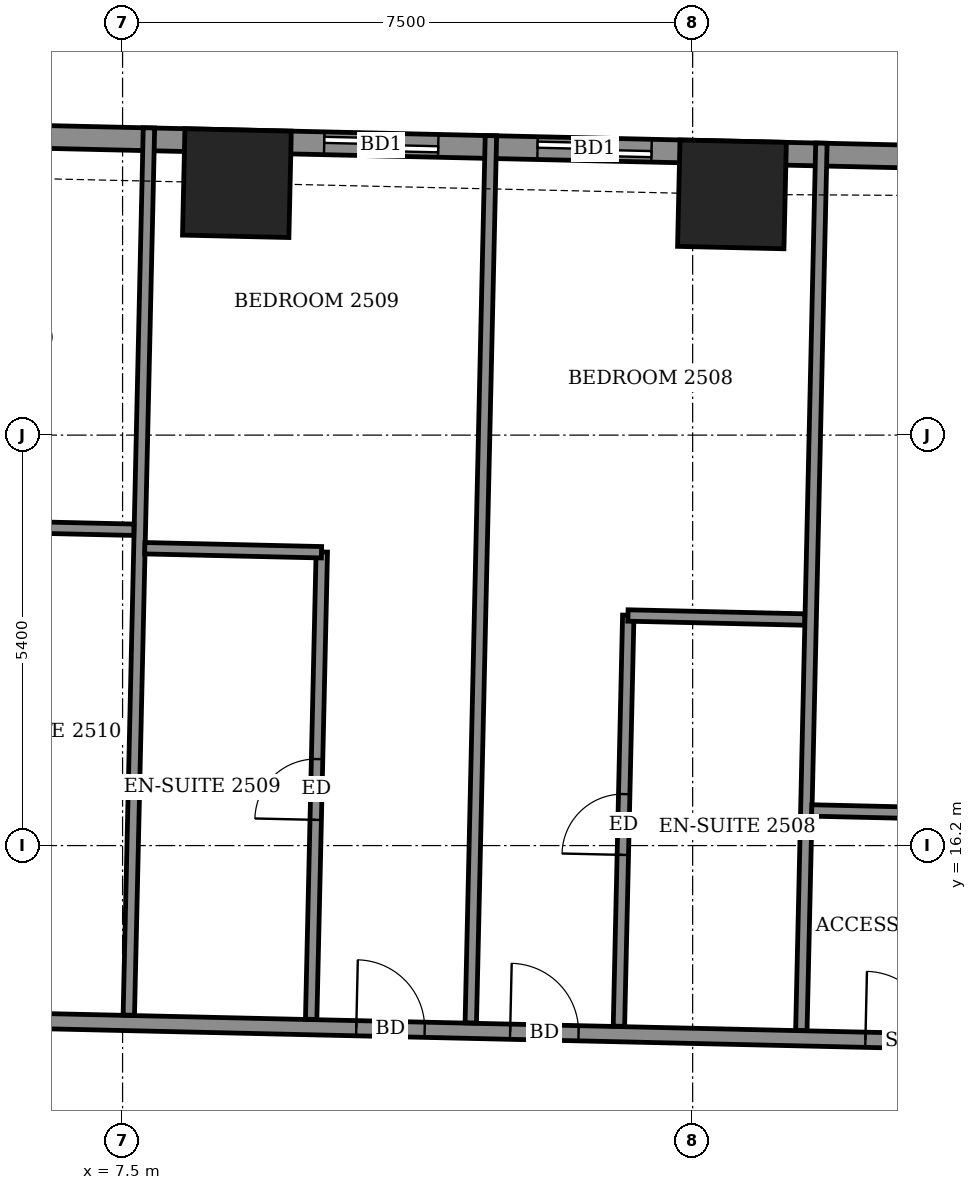
"""IFC4 building model, lengths in metres.
Left out: names, types, materials, properties, quantities, classifications, styles, units other than length and angle.
Written with IfcOpenShell. Run it as: python <this file> out.ifc"""

import sys

from ifc_helpers import new_model, si_unit, direction, frame, frame_2d, origin, origin_2d, place, context, subcontext, project, spatial, rectangle, extrude, element, fill, save


model = new_model("IFC4")
c1 = context("Model", 3, precision=1e-05, world=origin(), true_north=direction((0.0, 1.0)))
c2 = subcontext(c1, "Body", "Model", "MODEL_VIEW")
j1 = project(units=[si_unit("LENGTHUNIT", "METRE"), si_unit("PLANEANGLEUNIT", "RADIAN")], contexts=[c1])
p1 = place(None, origin())
s1 = spatial("IfcSite", under=j1, at=p1, CompositionType="ELEMENT")
p2 = place(p1, origin())
s2 = spatial("IfcBuilding", under=s1, at=p2, CompositionType="ELEMENT")
p3 = place(p2, frame((0.0, 0.0, 101.9)))
s3 = spatial("IfcBuildingStorey", under=s2, at=p3, CompositionType="ELEMENT", Elevation=101.9)
for number, where, z_axis, x_axis in (
    (1, (15.517, 24.767, -0.55), (0.0, 0.0, 1.0), (-1.0, 0.023, 0.0)),
    (2, (9.004, 24.915, -0.55), (0.0, 0.0, 1.0), (-1.0, 0.023, 0.0)),
):
    element("IfcColumn", number, at=place(p3, frame(where, z_axis=z_axis, x_axis=x_axis)), inside=s3, PredefinedType="COLUMN", context=c2, shape_type="SweptSolid", body=[
        extrude(rectangle(XDim=1.4, YDim=1.4, at=origin_2d()), origin(), (0.0, 0.0, 1.0), 3.6),
    ])
p4 = place(p3, frame((21.894, 25.173, 0.0), z_axis=(0.0, 0.0, 1.0), x_axis=(-0.999742661083, 0.022685052594, 0.0)))
e3 = element("IfcWall", 3, at=p4, inside=s3, PredefinedType="SOLIDWALL", context=c2, shape_type="SweptSolid", body=[
    extrude(rectangle(XDim=45.309, YDim=0.3, at=frame_2d((22.654, 0.0))), origin(), (0.0, 0.0, 1.0), 3.05),
])
p5 = place(p4, frame((2.319, 0.0, 0.0)))
e4 = element("IfcOpeningElement", 4, at=p5, cuts=e3, PredefinedType="OPENING", context=c2, shape_type="SweptSolid", body=[
    extrude(rectangle(XDim=1.5, YDim=2.4, at=frame_2d((0.75, 1.2))), frame((0.0, 0.16, 0.0), z_axis=(0.0, -1.0, 0.0), x_axis=(1.0, 0.0, 0.0)), (0.0, 0.0, 1.0), 0.32),
])
p6 = place(p4, frame((7.437, 0.0, 0.0)))
e5 = element("IfcOpeningElement", 5, at=p6, cuts=e3, PredefinedType="OPENING", context=c2, shape_type="SweptSolid", body=[
    extrude(rectangle(XDim=1.5, YDim=2.4, at=frame_2d((0.75, 1.2))), frame((0.0, 0.16, 0.0), z_axis=(0.0, -1.0, 0.0), x_axis=(1.0, 0.0, 0.0)), (0.0, 0.0, 1.0), 0.32),
])
p7 = place(p4, frame((10.244, 0.0, 0.0)))
e6 = element("IfcOpeningElement", 6, at=p7, cuts=e3, PredefinedType="OPENING", context=c2, shape_type="SweptSolid", body=[
    extrude(rectangle(XDim=1.5, YDim=2.4, at=frame_2d((0.75, 1.2))), frame((0.0, 0.16, 0.0), z_axis=(0.0, -1.0, 0.0), x_axis=(1.0, 0.0, 0.0)), (0.0, 0.0, 1.0), 0.32),
])
p8 = place(p4, frame((15.583, 0.0, 0.0)))
e7 = element("IfcOpeningElement", 7, at=p8, cuts=e3, PredefinedType="OPENING", context=c2, shape_type="SweptSolid", body=[
    extrude(rectangle(XDim=1.5, YDim=2.4, at=frame_2d((0.75, 1.2))), frame((0.0, 0.16, 0.0), z_axis=(0.0, -1.0, 0.0), x_axis=(1.0, 0.0, 0.0)), (0.0, 0.0, 1.0), 0.32),
])
p9 = place(p4, frame((20.677, 0.0, 0.0)))
e8 = element("IfcOpeningElement", 8, at=p9, cuts=e3, PredefinedType="OPENING", context=c2, shape_type="SweptSolid", body=[
    extrude(rectangle(XDim=1.5, YDim=2.4, at=frame_2d((0.75, 1.2))), frame((0.0, 0.16, 0.0), z_axis=(0.0, -1.0, 0.0), x_axis=(1.0, 0.0, 0.0)), (0.0, 0.0, 1.0), 0.32),
])
p10 = place(p4, frame((23.485, 0.0, 0.0)))
e9 = element("IfcOpeningElement", 9, at=p10, cuts=e3, PredefinedType="OPENING", context=c2, shape_type="SweptSolid", body=[
    extrude(rectangle(XDim=1.5, YDim=2.4, at=frame_2d((0.75, 1.2))), frame((0.0, 0.16, 0.0), z_axis=(0.0, -1.0, 0.0), x_axis=(1.0, 0.0, 0.0)), (0.0, 0.0, 1.0), 0.32),
])
p11 = place(p4, frame((28.708, 0.0, 0.0)))
e10 = element("IfcOpeningElement", 10, at=p11, cuts=e3, PredefinedType="OPENING", context=c2, shape_type="SweptSolid", body=[
    extrude(rectangle(XDim=1.5, YDim=2.4, at=frame_2d((0.75, 1.2))), frame((0.0, 0.16, 0.0), z_axis=(0.0, -1.0, 0.0), x_axis=(1.0, 0.0, 0.0)), (0.0, 0.0, 1.0), 0.32),
])
p12 = place(p4, frame((33.793, 0.0, 0.0)))
e11 = element("IfcOpeningElement", 11, at=p12, cuts=e3, PredefinedType="OPENING", context=c2, shape_type="SweptSolid", body=[
    extrude(rectangle(XDim=1.5, YDim=2.4, at=frame_2d((0.75, 1.2))), frame((0.0, 0.16, 0.0), z_axis=(0.0, -1.0, 0.0), x_axis=(1.0, 0.0, 0.0)), (0.0, 0.0, 1.0), 0.32),
])
p13 = place(p4, frame((36.6, 0.0, 0.0)))
e12 = element("IfcOpeningElement", 12, at=p13, cuts=e3, PredefinedType="OPENING", context=c2, shape_type="SweptSolid", body=[
    extrude(rectangle(XDim=1.5, YDim=2.4, at=frame_2d((0.75, 1.2))), frame((0.0, 0.16, 0.0), z_axis=(0.0, -1.0, 0.0), x_axis=(1.0, 0.0, 0.0)), (0.0, 0.0, 1.0), 0.32),
])
p14 = place(p4, frame((41.318, 0.0, 0.9)))
e13 = element("IfcOpeningElement", 13, at=p14, cuts=e3, PredefinedType="OPENING", context=c2, shape_type="SweptSolid", body=[
    extrude(rectangle(XDim=2.4, YDim=1.5, at=frame_2d((1.2, 0.75))), frame((0.0, 0.16, 0.0), z_axis=(0.0, -1.0, 0.0), x_axis=(1.0, 0.0, 0.0)), (0.0, 0.0, 1.0), 0.32),
])
p15 = place(p3, frame((-26.316, 14.634, 0.0), z_axis=(0.0, 0.0, 1.0), x_axis=(0.999742734556, -0.02268181435, 0.0)))
e14 = element("IfcWall", 14, at=p15, inside=s3, PredefinedType="PARTITIONING", context=c2, shape_type="SweptSolid", body=[
    extrude(rectangle(XDim=50.708, YDim=0.2, at=frame_2d((25.354, 0.0))), origin(), (0.0, 0.0, 1.0), 3.05),
])
p16 = place(p15, frame((48.229, 0.0, 0.0)))
e15 = element("IfcOpeningElement", 15, at=p16, cuts=e14, PredefinedType="OPENING", context=c2, shape_type="SweptSolid", body=[
    extrude(rectangle(XDim=1.0, YDim=2.1, at=frame_2d((0.5, 1.05))), frame((0.0, 0.11, 0.0), z_axis=(0.0, -1.0, 0.0), x_axis=(1.0, 0.0, 0.0)), (0.0, 0.0, 1.0), 0.22),
])
p17 = place(p15, frame((43.6, 0.0, 0.0)))
e16 = element("IfcOpeningElement", 16, at=p17, cuts=e14, PredefinedType="OPENING", context=c2, shape_type="SweptSolid", body=[
    extrude(rectangle(XDim=0.9, YDim=2.1, at=frame_2d((0.45, 1.05))), frame((0.0, 0.11, 0.0), z_axis=(0.0, -1.0, 0.0), x_axis=(1.0, 0.0, 0.0)), (0.0, 0.0, 1.0), 0.22),
])
p18 = place(p15, frame((38.925, 0.0, 0.0)))
e17 = element("IfcOpeningElement", 17, at=p18, cuts=e14, PredefinedType="OPENING", context=c2, shape_type="SweptSolid", body=[
    extrude(rectangle(XDim=0.9, YDim=2.1, at=frame_2d((0.45, 1.05))), frame((0.0, 0.11, 0.0), z_axis=(0.0, -1.0, 0.0), x_axis=(1.0, 0.0, 0.0)), (0.0, 0.0, 1.0), 0.22),
])
p19 = place(p15, frame((36.9, 0.0, 0.0)))
e18 = element("IfcOpeningElement", 18, at=p19, cuts=e14, PredefinedType="OPENING", context=c2, shape_type="SweptSolid", body=[
    extrude(rectangle(XDim=0.9, YDim=2.1, at=frame_2d((0.45, 1.05))), frame((0.0, 0.11, 0.0), z_axis=(0.0, -1.0, 0.0), x_axis=(1.0, 0.0, 0.0)), (0.0, 0.0, 1.0), 0.22),
])
p20 = place(p15, frame((29.975, 0.0, 0.0)))
e19 = element("IfcOpeningElement", 19, at=p20, cuts=e14, PredefinedType="OPENING", context=c2, shape_type="SweptSolid", body=[
    extrude(rectangle(XDim=0.9, YDim=2.1, at=frame_2d((0.45, 1.05))), frame((0.0, 0.11, 0.0), z_axis=(0.0, -1.0, 0.0), x_axis=(1.0, 0.0, 0.0)), (0.0, 0.0, 1.0), 0.22),
])
p21 = place(p15, frame((27.9, 0.0, 0.0)))
e20 = element("IfcOpeningElement", 20, at=p21, cuts=e14, PredefinedType="OPENING", context=c2, shape_type="SweptSolid", body=[
    extrude(rectangle(XDim=0.9, YDim=2.1, at=frame_2d((0.45, 1.05))), frame((0.0, 0.11, 0.0), z_axis=(0.0, -1.0, 0.0), x_axis=(1.0, 0.0, 0.0)), (0.0, 0.0, 1.0), 0.22),
])
p22 = place(p15, frame((21.175, 0.0, 0.0)))
e21 = element("IfcOpeningElement", 21, at=p22, cuts=e14, PredefinedType="OPENING", context=c2, shape_type="SweptSolid", body=[
    extrude(rectangle(XDim=0.9, YDim=2.1, at=frame_2d((0.45, 1.05))), frame((0.0, 0.11, 0.0), z_axis=(0.0, -1.0, 0.0), x_axis=(1.0, 0.0, 0.0)), (0.0, 0.0, 1.0), 0.22),
])
p23 = place(p15, frame((19.25, 0.0, 0.0)))
e22 = element("IfcOpeningElement", 22, at=p23, cuts=e14, PredefinedType="OPENING", context=c2, shape_type="SweptSolid", body=[
    extrude(rectangle(XDim=0.9, YDim=2.1, at=frame_2d((0.45, 1.05))), frame((0.0, 0.11, 0.0), z_axis=(0.0, -1.0, 0.0), x_axis=(1.0, 0.0, 0.0)), (0.0, 0.0, 1.0), 0.22),
])
p24 = place(p15, frame((12.375, 0.0, 0.0)))
e23 = element("IfcOpeningElement", 23, at=p24, cuts=e14, PredefinedType="OPENING", context=c2, shape_type="SweptSolid", body=[
    extrude(rectangle(XDim=0.9, YDim=2.1, at=frame_2d((0.45, 1.05))), frame((0.0, 0.11, 0.0), z_axis=(0.0, -1.0, 0.0), x_axis=(1.0, 0.0, 0.0)), (0.0, 0.0, 1.0), 0.22),
])
p25 = place(p15, frame((10.225, 0.0, 0.0)))
e24 = element("IfcOpeningElement", 24, at=p25, cuts=e14, PredefinedType="OPENING", context=c2, shape_type="SweptSolid", body=[
    extrude(rectangle(XDim=0.9, YDim=2.1, at=frame_2d((0.45, 1.05))), frame((0.0, 0.11, 0.0), z_axis=(0.0, -1.0, 0.0), x_axis=(1.0, 0.0, 0.0)), (0.0, 0.0, 1.0), 0.22),
])
p26 = place(p15, frame((0.85, 0.0, 0.0)))
e25 = element("IfcOpeningElement", 25, at=p26, cuts=e14, PredefinedType="OPENING", context=c2, shape_type="SweptSolid", body=[
    extrude(rectangle(XDim=1.0, YDim=2.1, at=frame_2d((0.5, 1.05))), frame((0.0, 0.11, 0.0), z_axis=(0.0, -1.0, 0.0), x_axis=(1.0, 0.0, 0.0)), (0.0, 0.0, 1.0), 0.22),
])
p27 = place(p15, frame((5.55, 0.0, 0.0)))
e26 = element("IfcOpeningElement", 26, at=p27, cuts=e14, PredefinedType="OPENING", context=c2, shape_type="SweptSolid", body=[
    extrude(rectangle(XDim=0.9, YDim=2.1, at=frame_2d((0.45, 1.05))), frame((0.0, 0.11, 0.0), z_axis=(0.0, -1.0, 0.0), x_axis=(1.0, 0.0, 0.0)), (0.0, 0.0, 1.0), 0.22),
])
p28 = place(p3, frame((7.582, 13.969, 0.0), z_axis=(0.0, 0.0, 1.0), x_axis=(0.022686732602, 0.99974262296, 0.0)))
e27 = element("IfcWall", 27, at=p28, inside=s3, PredefinedType="PARTITIONING", context=c2, shape_type="SweptSolid", body=[
    extrude(rectangle(XDim=11.676, YDim=0.15, at=frame_2d((5.838, 0.0))), origin(), (0.0, 0.0, 1.0), 2.55),
])
p29 = place(p3, frame((9.981, 13.914, 0.0), z_axis=(0.0, 0.0, 1.0), x_axis=(0.022784522714, 0.999740399066, 0.0)))
e28 = element("IfcWall", 28, at=p29, inside=s3, PredefinedType="PARTITIONING", context=c2, shape_type="SweptSolid", body=[
    extrude(rectangle(XDim=6.151, YDim=0.15, at=frame_2d((3.075, 0.0))), origin(), (0.0, 0.0, 1.0), 3.05),
])
p30 = place(p29, frame((2.625, 0.0, 0.0)))
e29 = element("IfcOpeningElement", 29, at=p30, cuts=e28, PredefinedType="OPENING", context=c2, shape_type="SweptSolid", body=[
    extrude(rectangle(XDim=0.8, YDim=2.1, at=frame_2d((0.4, 1.05))), frame((0.0, 0.085, 0.0), z_axis=(0.0, -1.0, 0.0), x_axis=(1.0, 0.0, 0.0)), (0.0, 0.0, 1.0), 0.17),
])
p31 = place(p3, frame((12.081, 13.867, 0.0), z_axis=(0.0, 0.0, 1.0), x_axis=(0.022686732602, 0.99974262296, 0.0)))
e30 = element("IfcWall", 30, at=p31, inside=s3, PredefinedType="PARTITIONING", context=c2, shape_type="SweptSolid", body=[
    extrude(rectangle(XDim=11.676, YDim=0.15, at=frame_2d((5.838, 0.0))), origin(), (0.0, 0.0, 1.0), 2.55),
])
p32 = place(p3, frame((14.03, 13.823, 0.0), z_axis=(0.0, 0.0, 1.0), x_axis=(0.022747035861, 0.999741252705, 0.0)))
e31 = element("IfcWall", 31, at=p32, inside=s3, PredefinedType="PARTITIONING", context=c2, shape_type="SweptSolid", body=[
    extrude(rectangle(XDim=5.409, YDim=0.15, at=frame_2d((2.705, 0.0))), origin(), (0.0, 0.0, 1.0), 3.05),
])
p33 = place(p32, frame((2.255, 0.0, 0.0)))
e32 = element("IfcOpeningElement", 32, at=p33, cuts=e31, PredefinedType="OPENING", context=c2, shape_type="SweptSolid", body=[
    extrude(rectangle(XDim=0.8, YDim=2.1, at=frame_2d((0.4, 1.05))), frame((0.0, 0.085, 0.0), z_axis=(0.0, -1.0, 0.0), x_axis=(1.0, 0.0, 0.0)), (0.0, 0.0, 1.0), 0.17),
])
p34 = place(p3, frame((16.43, 13.768, 0.0), z_axis=(0.0, 0.0, 1.0), x_axis=(0.022624509406, 0.999744033028, 0.0)))
e33 = element("IfcWall", 33, at=p34, inside=s3, PredefinedType="PARTITIONING", context=c2, shape_type="SweptSolid", body=[
    extrude(rectangle(XDim=11.676, YDim=0.15, at=frame_2d((5.838, 0.0))), origin(), (0.0, 0.0, 1.0), 2.55),
])
p35 = place(p3, frame((16.566, 16.662, 0.0), z_axis=(0.0, 0.0, 1.0), x_axis=(0.999735358199, -0.023004642294, 0.0)))
e34 = element("IfcWall", 34, at=p35, inside=s3, PredefinedType="PARTITIONING", context=c2, shape_type="SweptSolid", body=[
    extrude(rectangle(XDim=2.526, YDim=0.15, at=frame_2d((1.263, 0.0))), origin(), (0.0, 0.0, 1.0), 3.05),
])
p36 = place(p3, frame((14.149, 19.227, 0.0), z_axis=(0.0, 0.0, 1.0), x_axis=(0.999740260747, -0.02279059109, 0.0)))
e35 = element("IfcWall", 35, at=p36, inside=s3, PredefinedType="PARTITIONING", context=c2, shape_type="SweptSolid", body=[
    extrude(rectangle(XDim=2.324, YDim=0.15, at=frame_2d((1.162, 0.0))), origin(), (0.0, 0.0, 1.0), 3.05),
])
for number, where, z_axis, x_axis in (
    (36, (7.792, 20.112, 0.0), (0.0, 0.0, 1.0), (1.0, -0.023, 0.0)),
    (37, (5.323, 20.408, 0.0), (0.0, 0.0, 1.0), (1.0, -0.023, 0.0)),
):
    element("IfcWall", number, at=place(p3, frame(where, z_axis=z_axis, x_axis=x_axis)), inside=s3, PredefinedType="PARTITIONING", context=c2, shape_type="SweptSolid", body=[
        extrude(rectangle(XDim=2.325, YDim=0.15, at=frame_2d((1.163, 0.0))), origin(), (0.0, 0.0, 1.0), 3.05),
    ])
p37 = place(p6, origin())
e38 = element("IfcDoor", 38, at=p37, inside=s3, OperationType="SLIDING_TO_LEFT", PredefinedType="DOOR", context=c2, shape_type="SweptSolid", body=[
    extrude(rectangle(XDim=1.5, YDim=2.4, at=frame_2d((0.75, 1.2))), frame((0.0, 0.025, 0.0), z_axis=(0.0, -1.0, 0.0), x_axis=(1.0, 0.0, 0.0)), (0.0, 0.0, 1.0), 0.05),
])
fill(e5, e38)
p38 = place(p7, origin())
e39 = element("IfcDoor", 39, at=p38, inside=s3, OperationType="SLIDING_TO_LEFT", PredefinedType="DOOR", context=c2, shape_type="SweptSolid", body=[
    extrude(rectangle(XDim=1.5, YDim=2.4, at=frame_2d((0.75, 1.2))), frame((0.0, 0.025, 0.0), z_axis=(0.0, -1.0, 0.0), x_axis=(1.0, 0.0, 0.0)), (0.0, 0.0, 1.0), 0.05),
])
fill(e6, e39)
p39 = place(p17, origin())
e40 = element("IfcDoor", 40, at=p39, inside=s3, OperationType="SINGLE_SWING_RIGHT", PredefinedType="DOOR", context=c2, shape_type="SweptSolid", body=[
    extrude(rectangle(XDim=0.9, YDim=2.1, at=frame_2d((0.45, 1.05))), frame((0.0, 0.025, 0.0), z_axis=(0.0, -1.0, 0.0), x_axis=(1.0, 0.0, 0.0)), (0.0, 0.0, 1.0), 0.05),
])
fill(e16, e40)
p40 = place(p18, origin())
e41 = element("IfcDoor", 41, at=p40, inside=s3, OperationType="SINGLE_SWING_RIGHT", PredefinedType="DOOR", context=c2, shape_type="SweptSolid", body=[
    extrude(rectangle(XDim=0.9, YDim=2.1, at=frame_2d((0.45, 1.05))), frame((0.0, 0.025, 0.0), z_axis=(0.0, -1.0, 0.0), x_axis=(1.0, 0.0, 0.0)), (0.0, 0.0, 1.0), 0.05),
])
fill(e17, e41)
p41 = place(p33, origin())
e42 = element("IfcDoor", 42, at=p41, inside=s3, OperationType="SINGLE_SWING_RIGHT", PredefinedType="DOOR", context=c2, shape_type="SweptSolid", body=[
    extrude(rectangle(XDim=0.8, YDim=2.1, at=frame_2d((0.4, 1.05))), frame((0.0, 0.025, 0.0), z_axis=(0.0, -1.0, 0.0), x_axis=(1.0, 0.0, 0.0)), (0.0, 0.0, 1.0), 0.05),
])
fill(e32, e42)
p42 = place(p19, origin())
e43 = element("IfcDoor", 43, at=p42, inside=s3, OperationType="SINGLE_SWING_LEFT", PredefinedType="DOOR", context=c2, shape_type="SweptSolid", body=[
    extrude(rectangle(XDim=0.9, YDim=2.1, at=frame_2d((0.45, 1.05))), frame((0.0, 0.025, 0.0), z_axis=(0.0, -1.0, 0.0), x_axis=(1.0, 0.0, 0.0)), (0.0, 0.0, 1.0), 0.05),
])
fill(e18, e43)
p43 = place(p30, origin())
e44 = element("IfcDoor", 44, at=p43, inside=s3, OperationType="SINGLE_SWING_LEFT", PredefinedType="DOOR", context=c2, shape_type="SweptSolid", body=[
    extrude(rectangle(XDim=0.8, YDim=2.1, at=frame_2d((0.4, 1.05))), frame((0.0, 0.025, 0.0), z_axis=(0.0, -1.0, 0.0), x_axis=(1.0, 0.0, 0.0)), (0.0, 0.0, 1.0), 0.05),
])
fill(e29, e44)
save(model, sys.argv[1])
